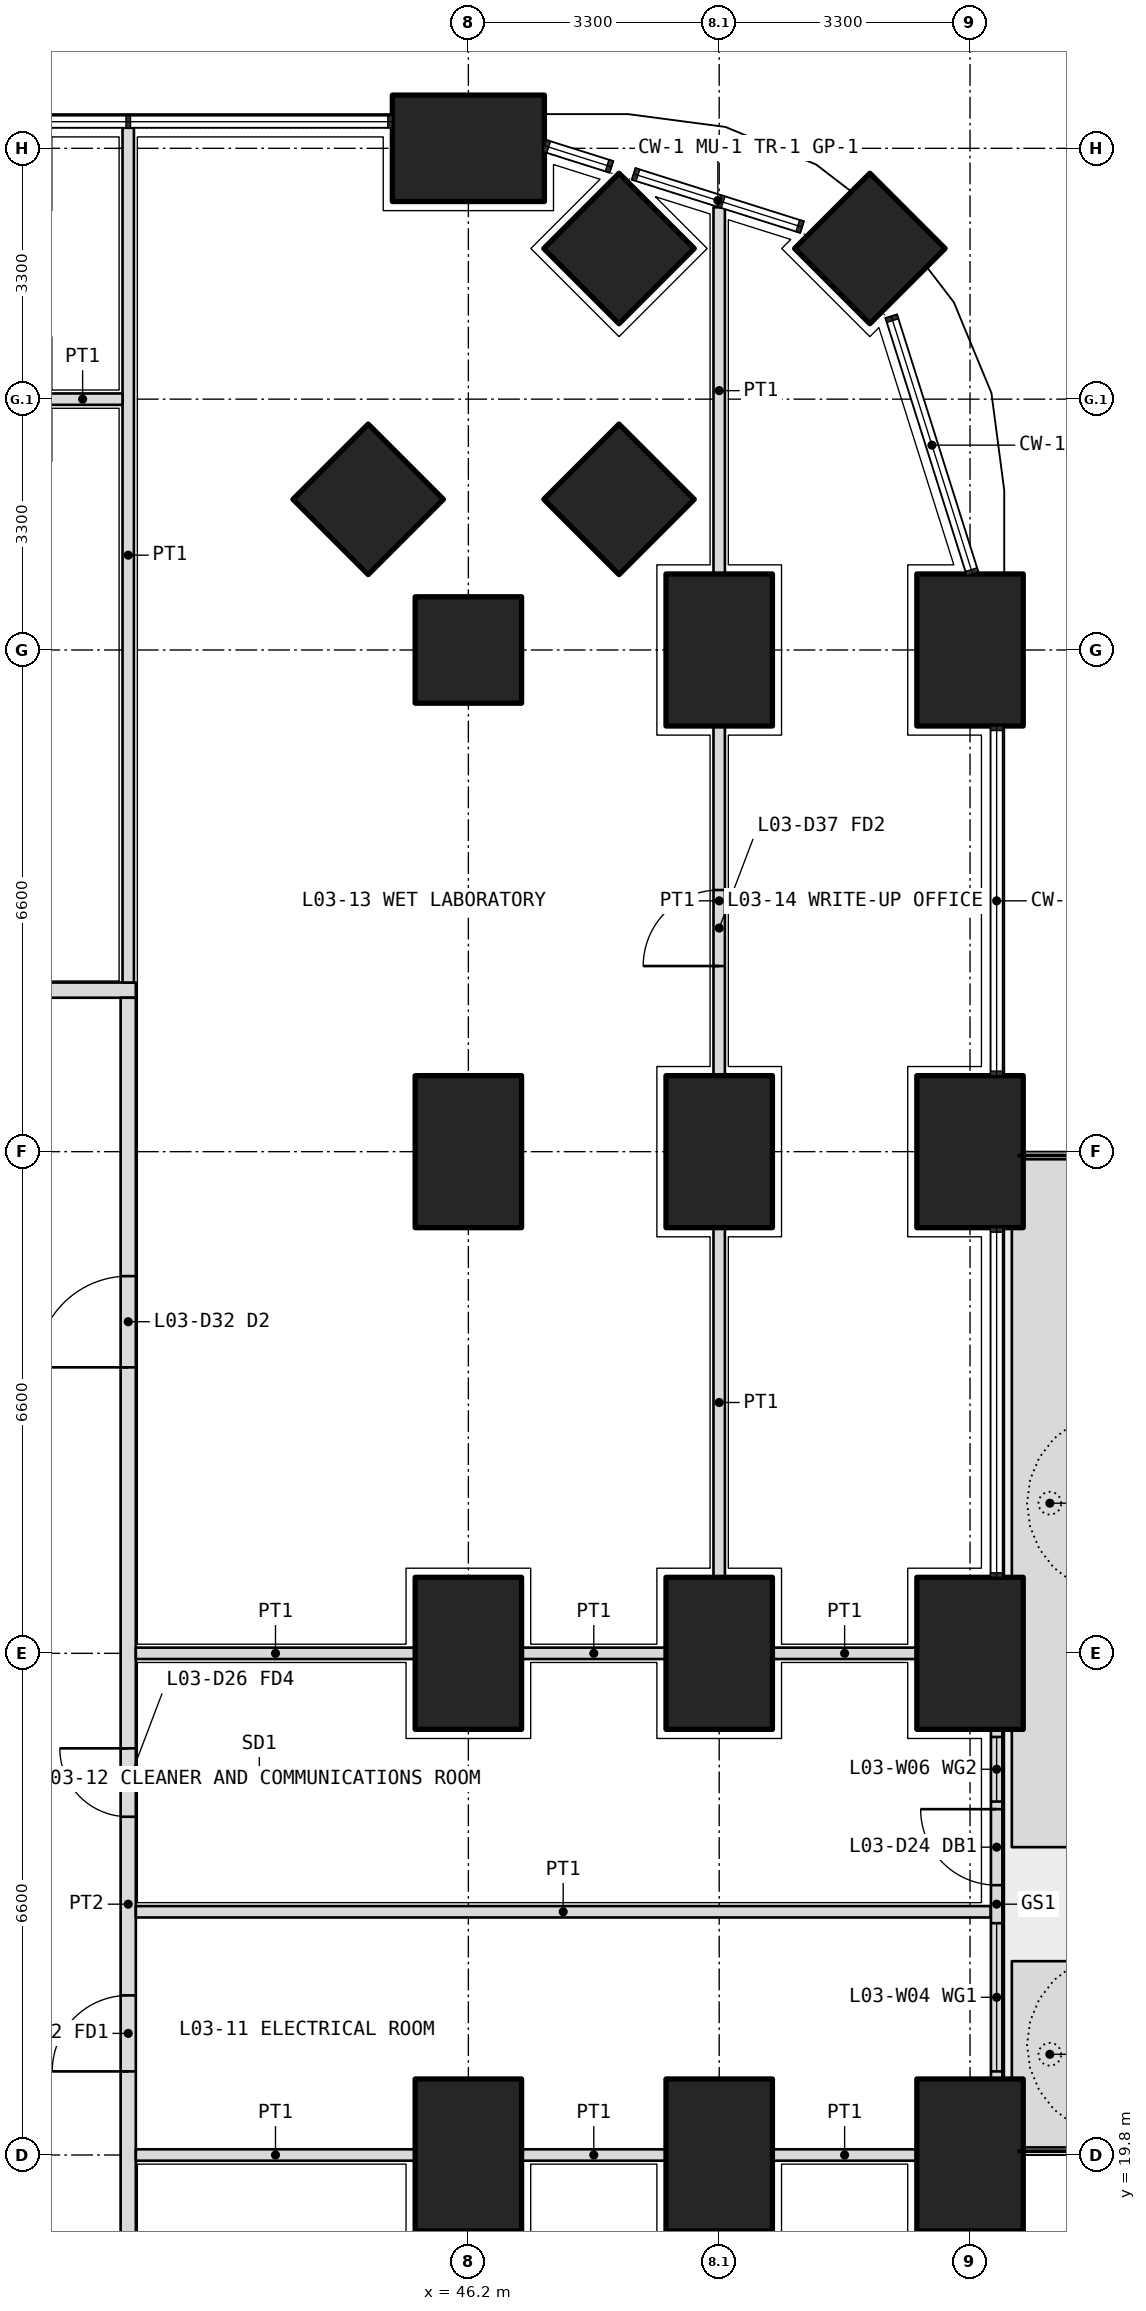
"""IFC4 building model, lengths in metres.
Left out: names, types, materials, properties, quantities, classifications, styles, units other than length and angle.
Written with IfcOpenShell. Run it as: python <this file> out.ifc"""

import sys

from ifc_helpers import new_model, si_unit, direction, frame, frame_2d, origin, origin_2d, place, context, subcontext, project, spatial, polyline, rectangle, outline, extrude, element, fill, save


model = new_model("IFC4")
c1 = context("Model", 3, precision=1e-05, world=origin(), true_north=direction((0.0, 1.0)))
c2 = subcontext(c1, "Body", "Model", "MODEL_VIEW")
j1 = project(units=[si_unit("LENGTHUNIT", "METRE"), si_unit("PLANEANGLEUNIT", "RADIAN")], contexts=[c1])
p1 = place(None, origin())
s1 = spatial("IfcSite", under=j1, at=p1, CompositionType="ELEMENT")
p2 = place(p1, origin())
s2 = spatial("IfcBuilding", under=s1, at=p2, CompositionType="ELEMENT")
p3 = place(p2, frame((0.0, 0.0, 17.1)))
s3 = spatial("IfcBuildingStorey", under=s2, at=p3, CompositionType="ELEMENT", Elevation=17.1)
p4 = place(p3, frame((51.482, 44.882, 0.0), z_axis=(0.0, 0.0, 1.0), x_axis=(0.707106781187, 0.707106781187, 0.0)))
e1 = element("IfcColumn", 1, at=p4, inside=s3, PredefinedType="COLUMN", context=c2, shape_type="SweptSolid", body=[
    extrude(rectangle(XDim=1.4, YDim=1.4, at=origin_2d()), origin(), (0.0, 0.0, 1.0), 4.2),
])
for number, where, z_axis, x_axis in (
    (2, (52.8, 19.8, 0.0), (0.0, 0.0, 1.0), (0.0, 1.0, 0.0)),
    (3, (52.8, 26.4, 0.0), (0.0, 0.0, 1.0), (0.0, 1.0, 0.0)),
    (4, (52.8, 33.0, 0.0), (0.0, 0.0, 1.0), (0.0, 1.0, 0.0)),
    (5, (52.8, 39.6, 0.0), (0.0, 0.0, 1.0), (0.0, 1.0, 0.0)),
    (6, (46.2, 46.2, 0.0), (0.0, 0.0, 1.0), (1.0, 0.0, 0.0)),
):
    element("IfcColumn", number, at=place(p3, frame(where, z_axis=z_axis, x_axis=x_axis)), inside=s3, PredefinedType="COLUMN", context=c2, shape_type="SweptSolid", body=[
        extrude(rectangle(XDim=2.0, YDim=1.4, at=origin_2d()), origin(), (0.0, 0.0, 1.0), 4.2),
    ])
for number, where, z_axis, x_axis in (
    (7, (46.2, 39.6, 0.0), (0.0, 0.0, 1.0), (1.0, 0.0, 0.0)),
    (8, (48.182, 44.882, 0.0), (0.0, 0.0, 1.0), (0.707, 0.707, 0.0)),
):
    element("IfcColumn", number, at=place(p3, frame(where, z_axis=z_axis, x_axis=x_axis)), inside=s3, PredefinedType="COLUMN", context=c2, shape_type="SweptSolid", body=[
        extrude(rectangle(XDim=1.4, YDim=1.4, at=origin_2d()), origin(), (0.0, 0.0, 1.0), 4.2),
    ])
for number, where, z_axis, x_axis in (
    (9, (49.5, 19.8, 0.0), (0.0, 0.0, 1.0), (0.0, 1.0, 0.0)),
    (10, (49.5, 26.4, 0.0), (0.0, 0.0, 1.0), (0.0, 1.0, 0.0)),
    (11, (49.5, 33.0, 0.0), (0.0, 0.0, 1.0), (0.0, 1.0, 0.0)),
    (12, (49.5, 39.6, 0.0), (0.0, 0.0, 1.0), (0.0, 1.0, 0.0)),
):
    element("IfcColumn", number, at=place(p3, frame(where, z_axis=z_axis, x_axis=x_axis)), inside=s3, PredefinedType="COLUMN", context=c2, shape_type="SweptSolid", body=[
        extrude(rectangle(XDim=2.0, YDim=1.4, at=origin_2d()), origin(), (0.0, 0.0, 1.0), 4.2),
    ])
for number, where, z_axis, x_axis in (
    (13, (48.182, 41.582, 0.0), (0.0, 0.0, 1.0), (0.707, 0.707, 0.0)),
    (14, (44.882, 41.582, 0.0), (0.0, 0.0, 1.0), (0.707, 0.707, 0.0)),
):
    element("IfcColumn", number, at=place(p3, frame(where, z_axis=z_axis, x_axis=x_axis)), inside=s3, PredefinedType="COLUMN", context=c2, shape_type="SweptSolid", body=[
        extrude(rectangle(XDim=1.4, YDim=1.4, at=origin_2d()), origin(), (0.0, 0.0, 1.0), 4.2),
    ])
for number, where, z_axis, x_axis in (
    (15, (46.2, 19.8, 0.0), (0.0, 0.0, 1.0), (0.0, 1.0, 0.0)),
    (16, (46.2, 26.4, 0.0), (0.0, 0.0, 1.0), (0.0, 1.0, 0.0)),
    (17, (46.2, 33.0, 0.0), (0.0, 0.0, 1.0), (0.0, 1.0, 0.0)),
):
    element("IfcColumn", number, at=place(p3, frame(where, z_axis=z_axis, x_axis=x_axis)), inside=s3, PredefinedType="COLUMN", context=c2, shape_type="SweptSolid", body=[
        extrude(rectangle(XDim=2.0, YDim=1.4, at=origin_2d()), origin(), (0.0, 0.0, 1.0), 4.2),
    ])
p5 = place(p3, origin())
e18 = element("IfcWall", 18, at=p5, inside=s3, PredefinedType="USERDEFINED", context=c2, shape_type="SweptSolid", body=[
    extrude(outline(polyline([(53.35, 19.9), (54.35, 19.9), (54.35, 22.35), (53.35, 22.35), (53.35, 19.9)]), holes=[polyline([(53.5, 20.05), (54.2, 20.05), (54.2, 22.2), (53.5, 22.2), (53.5, 20.05)])]), origin(), (0.0, 0.0, 1.0), 1.05),
])
p6 = place(p3, origin())
e19 = element("IfcWall", 19, at=p6, inside=s3, PredefinedType="USERDEFINED", context=c2, shape_type="SweptSolid", body=[
    extrude(outline(polyline([(53.35, 23.85), (54.35, 23.85), (54.35, 32.9), (53.35, 32.9), (53.35, 23.85)]), holes=[polyline([(53.5, 24.0), (54.2, 24.0), (54.2, 32.75), (53.5, 32.75), (53.5, 24.0)])]), origin(), (0.0, 0.0, 1.0), 1.05),
])
p7 = place(p3, frame((53.15, 20.8, 0.0), z_axis=(0.0, 0.0, 1.0), x_axis=(0.0, 1.0, 0.0)))
e20 = element("IfcWall", 20, at=p7, inside=s3, PredefinedType="SOLIDWALL", context=c2, shape_type="SweptSolid", body=[
    extrude(rectangle(XDim=4.6, YDim=0.15, at=frame_2d((2.3, 0.0))), origin(), (0.0, 0.0, 1.0), 2.7),
])
p8 = place(p7, frame((2.55, 0.0, 0.0)))
e21 = element("IfcOpeningElement", 21, at=p8, cuts=e20, PredefinedType="OPENING", context=c2, shape_type="SweptSolid", body=[
    extrude(rectangle(XDim=1.0, YDim=2.4, at=frame_2d((0.5, 1.2))), frame((0.0, 0.085, 0.0), z_axis=(0.0, -1.0, 0.0), x_axis=(1.0, 0.0, 0.0)), (0.0, 0.0, 1.0), 0.17),
])
p9 = place(p7, frame((0.1, 0.0, 0.1)))
e22 = element("IfcOpeningElement", 22, at=p9, cuts=e20, PredefinedType="OPENING", context=c2, shape_type="SweptSolid", body=[
    extrude(rectangle(XDim=1.95, YDim=2.3, at=frame_2d((0.975, 1.15))), frame((0.0, 0.085, 0.0), z_axis=(0.0, -1.0, 0.0), x_axis=(1.0, 0.0, 0.0)), (0.0, 0.0, 1.0), 0.17),
])
p10 = place(p7, frame((3.65, 0.0, 0.1)))
e23 = element("IfcOpeningElement", 23, at=p10, cuts=e20, PredefinedType="OPENING", context=c2, shape_type="SweptSolid", body=[
    extrude(rectangle(XDim=0.85, YDim=2.3, at=frame_2d((0.425, 1.15))), frame((0.0, 0.085, 0.0), z_axis=(0.0, -1.0, 0.0), x_axis=(1.0, 0.0, 0.0)), (0.0, 0.0, 1.0), 0.17),
])
p11 = place(p3, frame((10.975, 35.125, 0.0), z_axis=(0.0, 0.0, 1.0), x_axis=(1.0, 0.0, 0.0)))
e24 = element("IfcWall", 24, at=p11, inside=s3, PredefinedType="PARTITIONING", context=c2, shape_type="SweptSolid", body=[
    extrude(rectangle(XDim=30.85, YDim=0.2, at=frame_2d((15.425, 0.0))), origin(), (0.0, 0.0, 1.0), 2.85),
])
p12 = place(p11, frame((7.262, 0.0, 0.0)))
e25 = element("IfcOpeningElement", 25, at=p12, cuts=e24, PredefinedType="OPENING", context=c2, shape_type="SweptSolid", body=[
    extrude(rectangle(XDim=1.0, YDim=2.1, at=frame_2d((0.5, 1.05))), frame((0.0, 0.11, 0.0), z_axis=(0.0, -1.0, 0.0), x_axis=(1.0, 0.0, 0.0)), (0.0, 0.0, 1.0), 0.22),
])
p13 = place(p11, frame((22.587, 0.0, 0.0)))
e26 = element("IfcOpeningElement", 26, at=p13, cuts=e24, PredefinedType="OPENING", context=c2, shape_type="SweptSolid", body=[
    extrude(rectangle(XDim=1.0, YDim=2.1, at=frame_2d((0.5, 1.05))), frame((0.0, 0.11, 0.0), z_axis=(0.0, -1.0, 0.0), x_axis=(1.0, 0.0, 0.0)), (0.0, 0.0, 1.0), 0.22),
])
p14 = place(p3, frame((41.725, 11.175, 0.0), z_axis=(0.0, 0.0, 1.0), x_axis=(0.0, 1.0, 0.0)))
e27 = element("IfcWall", 27, at=p14, inside=s3, PredefinedType="PARTITIONING", context=c2, shape_type="SweptSolid", body=[
    extrude(rectangle(XDim=23.85, YDim=0.2, at=frame_2d((11.925, 0.0))), origin(), (0.0, 0.0, 1.0), 2.85),
])
p15 = place(p14, frame((3.762, 0.0, 0.0)))
e28 = element("IfcOpeningElement", 28, at=p15, cuts=e27, PredefinedType="OPENING", context=c2, shape_type="SweptSolid", body=[
    extrude(rectangle(XDim=1.0, YDim=2.1, at=frame_2d((0.5, 1.05))), frame((0.0, 0.11, 0.0), z_axis=(0.0, -1.0, 0.0), x_axis=(1.0, 0.0, 0.0)), (0.0, 0.0, 1.0), 0.22),
])
p16 = place(p14, frame((9.725, 0.0, 0.0)))
e29 = element("IfcOpeningElement", 29, at=p16, cuts=e27, PredefinedType="OPENING", context=c2, shape_type="SweptSolid", body=[
    extrude(rectangle(XDim=1.0, YDim=2.1, at=frame_2d((0.5, 1.05))), frame((0.0, 0.11, 0.0), z_axis=(0.0, -1.0, 0.0), x_axis=(1.0, 0.0, 0.0)), (0.0, 0.0, 1.0), 0.22),
])
p17 = place(p14, frame((13.075, 0.0, 0.0)))
e30 = element("IfcOpeningElement", 30, at=p17, cuts=e27, PredefinedType="OPENING", context=c2, shape_type="SweptSolid", body=[
    extrude(rectangle(XDim=0.9, YDim=2.1, at=frame_2d((0.45, 1.05))), frame((0.0, 0.11, 0.0), z_axis=(0.0, -1.0, 0.0), x_axis=(1.0, 0.0, 0.0)), (0.0, 0.0, 1.0), 0.22),
])
p18 = place(p14, frame((18.988, 0.0, 0.0)))
e31 = element("IfcOpeningElement", 31, at=p18, cuts=e27, PredefinedType="OPENING", context=c2, shape_type="SweptSolid", body=[
    extrude(rectangle(XDim=1.2, YDim=2.1, at=frame_2d((0.6, 1.05))), frame((0.0, 0.11, 0.0), z_axis=(0.0, -1.0, 0.0), x_axis=(1.0, 0.0, 0.0)), (0.0, 0.0, 1.0), 0.22),
])
p19 = place(p3, frame((41.725, 46.47, 0.0), z_axis=(0.0, 0.0, 1.0), x_axis=(0.0, -1.0, 0.0)))
e32 = element("IfcWall", 32, at=p19, inside=s3, PredefinedType="PARTITIONING", context=c2, shape_type="SweptSolid", body=[
    extrude(rectangle(XDim=11.245, YDim=0.15, at=frame_2d((5.623, 0.0))), origin(), (0.0, 0.0, 1.0), 2.7),
])
p20 = place(p3, frame((49.5, 27.4, 0.0), z_axis=(0.0, 0.0, 1.0), x_axis=(0.0, 1.0, 0.0)))
e33 = element("IfcWall", 33, at=p20, inside=s3, PredefinedType="PARTITIONING", context=c2, shape_type="SweptSolid", body=[
    extrude(rectangle(XDim=4.6, YDim=0.15, at=frame_2d((2.3, 0.0))), origin(), (0.0, 0.0, 1.0), 3.9),
])
p21 = place(p3, frame((49.5, 34.0, 0.0), z_axis=(0.0, 0.0, 1.0), x_axis=(0.0, 1.0, 0.0)))
e34 = element("IfcWall", 34, at=p21, inside=s3, PredefinedType="PARTITIONING", context=c2, shape_type="SweptSolid", body=[
    extrude(rectangle(XDim=4.6, YDim=0.15, at=frame_2d((2.3, 0.0))), origin(), (0.0, 0.0, 1.0), 3.9),
])
p22 = place(p21, frame((1.442, 0.0, 0.0)))
e35 = element("IfcOpeningElement", 35, at=p22, cuts=e34, PredefinedType="OPENING", context=c2, shape_type="SweptSolid", body=[
    extrude(rectangle(XDim=1.0, YDim=2.1, at=frame_2d((0.5, 1.05))), frame((0.0, 0.085, 0.0), z_axis=(0.0, -1.0, 0.0), x_axis=(1.0, 0.0, 0.0)), (0.0, 0.0, 1.0), 0.17),
])
p23 = place(p3, frame((49.5, 40.6, 0.0), z_axis=(0.0, 0.0, 1.0), x_axis=(0.0, 1.0, 0.0)))
e36 = element("IfcWall", 36, at=p23, inside=s3, PredefinedType="PARTITIONING", context=c2, shape_type="SweptSolid", body=[
    extrude(rectangle(XDim=4.824, YDim=0.15, at=frame_2d((2.412, 0.0))), origin(), (0.0, 0.0, 1.0), 2.7),
])
p24 = place(p3, frame((53.07, 23.0, 0.0), z_axis=(0.0, 0.0, 1.0), x_axis=(-1.0, 0.0, 0.0)))
e37 = element("IfcWall", 37, at=p24, inside=s3, PredefinedType="PARTITIONING", context=c2, shape_type="SweptSolid", body=[
    extrude(rectangle(XDim=11.245, YDim=0.15, at=frame_2d((5.623, 0.0))), origin(), (0.0, 0.0, 1.0), 2.7),
])
for number, where, z_axis, x_axis in (
    (38, (52.1, 26.4, 0.0), (0.0, 0.0, 1.0), (-1.0, 0.0, 0.0)),
    (39, (48.8, 26.4, 0.0), (0.0, 0.0, 1.0), (-1.0, 0.0, 0.0)),
):
    element("IfcWall", number, at=place(p3, frame(where, z_axis=z_axis, x_axis=x_axis)), inside=s3, PredefinedType="PARTITIONING", context=c2, shape_type="SweptSolid", body=[
        extrude(rectangle(XDim=1.9, YDim=0.15, at=frame_2d((0.95, 0.0))), origin(), (0.0, 0.0, 1.0), 2.85),
    ])
p25 = place(p3, frame((45.5, 26.4, 0.0), z_axis=(0.0, 0.0, 1.0), x_axis=(-1.0, 0.0, 0.0)))
e40 = element("IfcWall", 40, at=p25, inside=s3, PredefinedType="PARTITIONING", context=c2, shape_type="SweptSolid", body=[
    extrude(rectangle(XDim=3.675, YDim=0.15, at=frame_2d((1.837, 0.0))), origin(), (0.0, 0.0, 1.0), 2.85),
])
for number, where, z_axis, x_axis in (
    (41, (52.1, 19.8, 0.0), (0.0, 0.0, 1.0), (-1.0, 0.0, 0.0)),
    (42, (48.8, 19.8, 0.0), (0.0, 0.0, 1.0), (-1.0, 0.0, 0.0)),
):
    element("IfcWall", number, at=place(p3, frame(where, z_axis=z_axis, x_axis=x_axis)), inside=s3, PredefinedType="PARTITIONING", context=c2, shape_type="SweptSolid", body=[
        extrude(rectangle(XDim=1.9, YDim=0.15, at=frame_2d((0.95, 0.0))), origin(), (0.0, 0.0, 1.0), 2.85),
    ])
p26 = place(p3, frame((45.5, 19.8, 0.0), z_axis=(0.0, 0.0, 1.0), x_axis=(-1.0, 0.0, 0.0)))
e43 = element("IfcWall", 43, at=p26, inside=s3, PredefinedType="PARTITIONING", context=c2, shape_type="SweptSolid", body=[
    extrude(rectangle(XDim=3.675, YDim=0.15, at=frame_2d((1.837, 0.0))), origin(), (0.0, 0.0, 1.0), 2.85),
])
p27 = place(p3, frame((41.65, 42.9, 0.0), z_axis=(0.0, 0.0, 1.0), x_axis=(-1.0, 0.0, 0.0)))
e44 = element("IfcWall", 44, at=p27, inside=s3, PredefinedType="PARTITIONING", context=c2, shape_type="SweptSolid", body=[
    extrude(rectangle(XDim=1.05, YDim=0.15, at=frame_2d((0.525, 0.0))), origin(), (0.0, 0.0, 1.0), 3.9),
])
p28 = place(p8, origin())
e45 = element("IfcDoor", 45, at=p28, inside=s3, OperationType="SINGLE_SWING_RIGHT", PredefinedType="DOOR", context=c2, shape_type="SweptSolid", body=[
    extrude(rectangle(XDim=1.0, YDim=2.4, at=frame_2d((0.5, 1.2))), frame((0.0, 0.025, 0.0), z_axis=(0.0, -1.0, 0.0), x_axis=(1.0, 0.0, 0.0)), (0.0, 0.0, 1.0), 0.05),
])
fill(e21, e45)
p29 = place(p9, origin())
e46 = element("IfcWindow", 46, at=p29, inside=s3, PartitioningType="SINGLE_PANEL", PredefinedType="WINDOW", context=c2, shape_type="SweptSolid", body=[
    extrude(rectangle(XDim=1.95, YDim=2.3, at=frame_2d((0.975, 1.15))), frame((0.0, 0.03, 0.0), z_axis=(0.0, -1.0, 0.0), x_axis=(1.0, 0.0, 0.0)), (0.0, 0.0, 1.0), 0.06),
])
fill(e22, e46)
p30 = place(p10, origin())
e47 = element("IfcWindow", 47, at=p30, inside=s3, PartitioningType="SINGLE_PANEL", PredefinedType="WINDOW", context=c2, shape_type="SweptSolid", body=[
    extrude(rectangle(XDim=0.85, YDim=2.3, at=frame_2d((0.425, 1.15))), frame((0.0, 0.03, 0.0), z_axis=(0.0, -1.0, 0.0), x_axis=(1.0, 0.0, 0.0)), (0.0, 0.0, 1.0), 0.06),
])
fill(e23, e47)
p31 = place(p16, origin())
e48 = element("IfcDoor", 48, at=p31, inside=s3, OperationType="SINGLE_SWING_LEFT", PredefinedType="DOOR", context=c2, shape_type="SweptSolid", body=[
    extrude(rectangle(XDim=1.0, YDim=2.1, at=frame_2d((0.5, 1.05))), frame((0.0, 0.025, 0.0), z_axis=(0.0, -1.0, 0.0), x_axis=(1.0, 0.0, 0.0)), (0.0, 0.0, 1.0), 0.05),
])
fill(e29, e48)
p32 = place(p17, origin())
e49 = element("IfcDoor", 49, at=p32, inside=s3, OperationType="SINGLE_SWING_RIGHT", PredefinedType="DOOR", context=c2, shape_type="SweptSolid", body=[
    extrude(rectangle(XDim=0.9, YDim=2.1, at=frame_2d((0.45, 1.05))), frame((0.0, 0.025, 0.0), z_axis=(0.0, -1.0, 0.0), x_axis=(1.0, 0.0, 0.0)), (0.0, 0.0, 1.0), 0.05),
])
fill(e30, e49)
p33 = place(p18, origin())
e50 = element("IfcDoor", 50, at=p33, inside=s3, OperationType="DOUBLE_DOOR_SINGLE_SWING", PredefinedType="DOOR", context=c2, shape_type="SweptSolid", body=[
    extrude(rectangle(XDim=1.2, YDim=2.1, at=frame_2d((0.6, 1.05))), frame((0.0, 0.025, 0.0), z_axis=(0.0, -1.0, 0.0), x_axis=(1.0, 0.0, 0.0)), (0.0, 0.0, 1.0), 0.05),
])
fill(e31, e50)
p34 = place(p22, origin())
e51 = element("IfcDoor", 51, at=p34, inside=s3, OperationType="SINGLE_SWING_LEFT", PredefinedType="DOOR", context=c2, shape_type="SweptSolid", body=[
    extrude(rectangle(XDim=1.0, YDim=2.1, at=frame_2d((0.5, 1.05))), frame((0.0, 0.025, 0.0), z_axis=(0.0, -1.0, 0.0), x_axis=(1.0, 0.0, 0.0)), (0.0, 0.0, 1.0), 0.05),
])
fill(e35, e51)
save(model, sys.argv[1])
